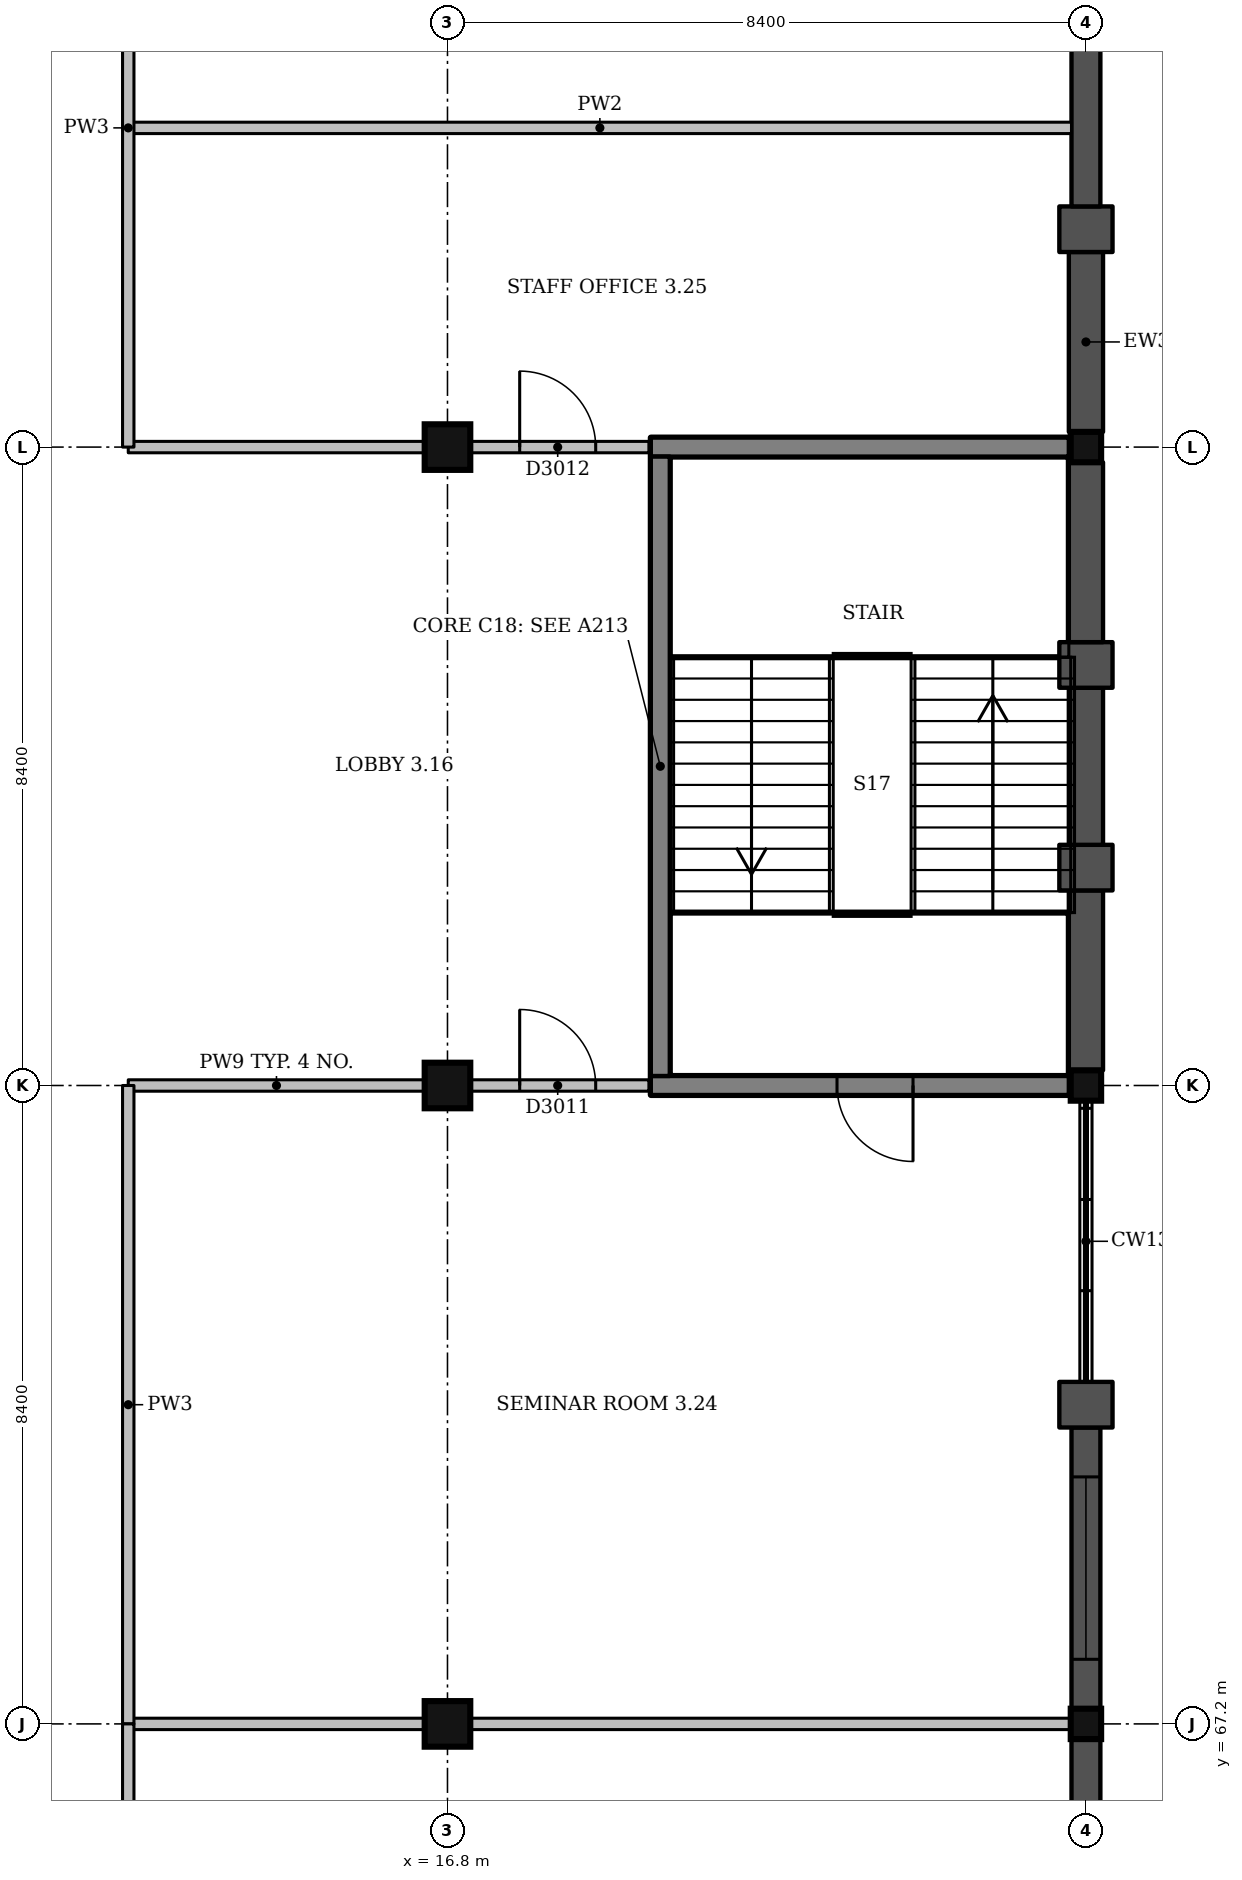
"""IFC4 building model, lengths in metres.
Left out: names, types, materials, properties, quantities, classifications, styles, units other than length and angle.
Written with IfcOpenShell. Run it as: python <this file> out.ifc"""

import sys

from ifc_helpers import new_model, si_unit, direction, frame, frame_2d, origin, origin_2d, place, context, subcontext, project, spatial, rectangle, extrude, element, fill, save


model = new_model("IFC4")
c1 = context("Model", 3, precision=1e-05, world=origin(), true_north=direction((0.0, 1.0)))
c2 = subcontext(c1, "Body", "Model", "MODEL_VIEW")
j1 = project(units=[si_unit("LENGTHUNIT", "METRE"), si_unit("PLANEANGLEUNIT", "RADIAN")], contexts=[c1])
p1 = place(None, origin())
s1 = spatial("IfcSite", under=j1, at=p1, CompositionType="ELEMENT")
p2 = place(p1, origin())
s2 = spatial("IfcBuilding", under=s1, at=p2, CompositionType="ELEMENT")
p3 = place(p2, frame((0.0, 0.0, 13.5)))
s3 = spatial("IfcBuildingStorey", under=s2, at=p3, CompositionType="ELEMENT", Elevation=13.5)
for number, where, z_axis, x_axis in (
    (1, (16.8, 67.2, 0.0), (0.0, 0.0, 1.0), (1.0, 0.0, 0.0)),
    (2, (16.8, 75.6, 0.0), (0.0, 0.0, 1.0), (1.0, 0.0, 0.0)),
    (3, (16.8, 84.0, 0.0), (0.0, 0.0, 1.0), (1.0, 0.0, 0.0)),
):
    element("IfcColumn", number, at=place(p3, frame(where, z_axis=z_axis, x_axis=x_axis)), inside=s3, PredefinedType="COLUMN", context=c2, shape_type="SweptSolid", body=[
        extrude(rectangle(XDim=0.6, YDim=0.6, at=origin_2d()), origin(), (0.0, 0.0, 1.0), 4.5),
    ])
for number, where, z_axis, x_axis in (
    (4, (25.2, 67.2, 0.0), (0.0, 0.0, 1.0), (1.0, 0.0, 0.0)),
    (5, (25.2, 75.6, 0.0), (0.0, 0.0, 1.0), (1.0, 0.0, 0.0)),
    (6, (25.2, 84.0, 0.0), (0.0, 0.0, 1.0), (1.0, 0.0, 0.0)),
):
    element("IfcColumn", number, at=place(p3, frame(where, z_axis=z_axis, x_axis=x_axis)), inside=s3, PredefinedType="COLUMN", context=c2, shape_type="SweptSolid", body=[
        extrude(rectangle(XDim=0.4, YDim=0.4, at=origin_2d()), origin(), (0.0, 0.0, 1.0), 4.5),
    ])
p4 = place(p3, frame((19.475, 75.6, 0.0), z_axis=(0.0, 0.0, 1.0), x_axis=(1.0, 0.0, 0.0)))
e7 = element("IfcWall", 7, at=p4, inside=s3, PredefinedType="SHEAR", context=c2, shape_type="SweptSolid", body=[
    extrude(rectangle(XDim=5.5, YDim=0.25, at=frame_2d((2.75, 0.0))), origin(), (0.0, 0.0, 1.0), 4.5),
])
p5 = place(p4, frame((2.45, 0.0, 0.0)))
e8 = element("IfcOpeningElement", 8, at=p5, cuts=e7, PredefinedType="OPENING", context=c2, shape_type="SweptSolid", body=[
    extrude(rectangle(XDim=1.0, YDim=2.1, at=frame_2d((0.5, 1.05))), frame((0.0, 0.135, 0.0), z_axis=(0.0, -1.0, 0.0), x_axis=(1.0, 0.0, 0.0)), (0.0, 0.0, 1.0), 0.27),
])
p6 = place(p3, frame((19.475, 84.0, 0.0), z_axis=(0.0, 0.0, 1.0), x_axis=(1.0, 0.0, 0.0)))
e9 = element("IfcWall", 9, at=p6, inside=s3, PredefinedType="SHEAR", context=c2, shape_type="SweptSolid", body=[
    extrude(rectangle(XDim=5.5, YDim=0.25, at=frame_2d((2.75, 0.0))), origin(), (0.0, 0.0, 1.0), 4.5),
])
p7 = place(p3, frame((19.6, 75.725, 0.0), z_axis=(0.0, 0.0, 1.0), x_axis=(0.0, 1.0, 0.0)))
e10 = element("IfcWall", 10, at=p7, inside=s3, PredefinedType="SHEAR", context=c2, shape_type="SweptSolid", body=[
    extrude(rectangle(XDim=8.15, YDim=0.25, at=frame_2d((4.075, 0.0))), origin(), (0.0, 0.0, 1.0), 4.5),
])
p8 = place(p3, frame((25.2, 64.633, 0.0), z_axis=(0.0, 0.0, 1.0), x_axis=(0.0, 1.0, 0.0)))
e11 = element("IfcWall", 11, at=p8, inside=s3, PredefinedType="SOLIDWALL", context=c2, shape_type="SweptSolid", body=[
    extrude(rectangle(XDim=2.367, YDim=0.38, at=frame_2d((1.183, 0.0))), origin(), (0.0, 0.0, 1.0), 3.35),
])
p9 = place(p3, frame((25.2, 67.4, 0.0), z_axis=(0.0, 0.0, 1.0), x_axis=(0.0, 1.0, 0.0)))
e12 = element("IfcWall", 12, at=p9, inside=s3, PredefinedType="SOLIDWALL", context=c2, shape_type="SweptSolid", body=[
    extrude(rectangle(XDim=3.7, YDim=0.38, at=frame_2d((1.85, 0.0))), origin(), (0.0, 0.0, 1.0), 3.35),
])
p10 = place(p9, frame((0.65, 0.0, 1.2)))
e13 = element("IfcOpeningElement", 13, at=p10, cuts=e12, PredefinedType="OPENING", context=c2, shape_type="SweptSolid", body=[
    extrude(rectangle(XDim=2.4, YDim=1.5, at=frame_2d((1.2, 0.75))), frame((0.0, 0.2, 0.0), z_axis=(0.0, -1.0, 0.0), x_axis=(1.0, 0.0, 0.0)), (0.0, 0.0, 1.0), 0.4),
])
p11 = place(p3, frame((25.2, 71.1, 0.0), z_axis=(0.0, 0.0, 1.0), x_axis=(0.0, 1.0, 0.0)))
e14 = element("IfcWall", 14, at=p11, inside=s3, PredefinedType="SOLIDWALL", context=c2, shape_type="SweptSolid", body=[
    extrude(rectangle(XDim=0.6, YDim=0.7, at=frame_2d((0.3, 0.0))), origin(), (0.0, 0.0, 1.0), 3.35),
])
p12 = place(p3, frame((25.2, 75.8, 0.0), z_axis=(0.0, 0.0, 1.0), x_axis=(0.0, 1.0, 0.0)))
e15 = element("IfcWall", 15, at=p12, inside=s3, PredefinedType="SOLIDWALL", context=c2, shape_type="SweptSolid", body=[
    extrude(rectangle(XDim=2.367, YDim=0.45, at=frame_2d((1.183, 0.0))), origin(), (0.0, 0.0, 1.0), 3.65),
])
p13 = place(p3, frame((25.2, 78.167, 0.0), z_axis=(0.0, 0.0, 1.0), x_axis=(0.0, 1.0, 0.0)))
e16 = element("IfcWall", 16, at=p13, inside=s3, PredefinedType="SOLIDWALL", context=c2, shape_type="SweptSolid", body=[
    extrude(rectangle(XDim=0.6, YDim=0.7, at=frame_2d((0.3, 0.0))), origin(), (0.0, 0.0, 1.0), 3.65),
])
p14 = place(p3, frame((25.2, 78.767, 0.0), z_axis=(0.0, 0.0, 1.0), x_axis=(0.0, 1.0, 0.0)))
e17 = element("IfcWall", 17, at=p14, inside=s3, PredefinedType="SOLIDWALL", context=c2, shape_type="SweptSolid", body=[
    extrude(rectangle(XDim=2.067, YDim=0.45, at=frame_2d((1.033, 0.0))), origin(), (0.0, 0.0, 1.0), 3.65),
])
p15 = place(p3, frame((25.2, 80.833, 0.0), z_axis=(0.0, 0.0, 1.0), x_axis=(0.0, 1.0, 0.0)))
e18 = element("IfcWall", 18, at=p15, inside=s3, PredefinedType="SOLIDWALL", context=c2, shape_type="SweptSolid", body=[
    extrude(rectangle(XDim=0.6, YDim=0.7, at=frame_2d((0.3, 0.0))), origin(), (0.0, 0.0, 1.0), 3.65),
])
p16 = place(p3, frame((25.2, 81.433, 0.0), z_axis=(0.0, 0.0, 1.0), x_axis=(0.0, 1.0, 0.0)))
e19 = element("IfcWall", 19, at=p16, inside=s3, PredefinedType="SOLIDWALL", context=c2, shape_type="SweptSolid", body=[
    extrude(rectangle(XDim=2.367, YDim=0.45, at=frame_2d((1.183, 0.0))), origin(), (0.0, 0.0, 1.0), 3.65),
])
p17 = place(p3, frame((25.2, 84.2, 0.0), z_axis=(0.0, 0.0, 1.0), x_axis=(0.0, 1.0, 0.0)))
e20 = element("IfcWall", 20, at=p17, inside=s3, PredefinedType="SOLIDWALL", context=c2, shape_type="SweptSolid", body=[
    extrude(rectangle(XDim=2.367, YDim=0.45, at=frame_2d((1.183, 0.0))), origin(), (0.0, 0.0, 1.0), 3.35),
])
p18 = place(p3, frame((25.2, 86.567, 0.0), z_axis=(0.0, 0.0, 1.0), x_axis=(0.0, 1.0, 0.0)))
e21 = element("IfcWall", 21, at=p18, inside=s3, PredefinedType="SOLIDWALL", context=c2, shape_type="SweptSolid", body=[
    extrude(rectangle(XDim=0.6, YDim=0.7, at=frame_2d((0.3, 0.0))), origin(), (0.0, 0.0, 1.0), 3.35),
])
p19 = place(p3, frame((25.2, 87.167, 0.0), z_axis=(0.0, 0.0, 1.0), x_axis=(0.0, 1.0, 0.0)))
e22 = element("IfcWall", 22, at=p19, inside=s3, PredefinedType="SOLIDWALL", context=c2, shape_type="SweptSolid", body=[
    extrude(rectangle(XDim=2.067, YDim=0.38, at=frame_2d((1.033, 0.0))), origin(), (0.0, 0.0, 1.0), 3.35),
])
p20 = place(p3, frame((12.6, 67.2, 0.0), z_axis=(0.0, 0.0, 1.0), x_axis=(1.0, 0.0, 0.0)))
e23 = element("IfcWall", 23, at=p20, inside=s3, PredefinedType="PARTITIONING", context=c2, shape_type="SweptSolid", body=[
    extrude(rectangle(XDim=3.9, YDim=0.15, at=frame_2d((1.95, 0.0))), origin(), (0.0, 0.0, 1.0), 3.4),
])
p21 = place(p3, frame((17.1, 67.2, 0.0), z_axis=(0.0, 0.0, 1.0), x_axis=(1.0, 0.0, 0.0)))
e24 = element("IfcWall", 24, at=p21, inside=s3, PredefinedType="PARTITIONING", context=c2, shape_type="SweptSolid", body=[
    extrude(rectangle(XDim=7.9, YDim=0.15, at=frame_2d((3.95, 0.0))), origin(), (0.0, 0.0, 1.0), 3.35),
])
p22 = place(p3, frame((12.6, 75.6, 0.0), z_axis=(0.0, 0.0, 1.0), x_axis=(1.0, 0.0, 0.0)))
e25 = element("IfcWall", 25, at=p22, inside=s3, PredefinedType="PARTITIONING", context=c2, shape_type="SweptSolid", body=[
    extrude(rectangle(XDim=3.9, YDim=0.15, at=frame_2d((1.95, 0.0))), origin(), (0.0, 0.0, 1.0), 3.4),
])
p23 = place(p3, frame((17.1, 75.6, 0.0), z_axis=(0.0, 0.0, 1.0), x_axis=(1.0, 0.0, 0.0)))
e26 = element("IfcWall", 26, at=p23, inside=s3, PredefinedType="PARTITIONING", context=c2, shape_type="SweptSolid", body=[
    extrude(rectangle(XDim=2.35, YDim=0.15, at=frame_2d((1.175, 0.0))), origin(), (0.0, 0.0, 1.0), 3.5),
])
p24 = place(p23, frame((0.65, 0.0, 0.0)))
e27 = element("IfcOpeningElement", 27, at=p24, cuts=e26, PredefinedType="OPENING", context=c2, shape_type="SweptSolid", body=[
    extrude(rectangle(XDim=1.0, YDim=2.1, at=frame_2d((0.5, 1.05))), frame((0.0, 0.085, 0.0), z_axis=(0.0, -1.0, 0.0), x_axis=(1.0, 0.0, 0.0)), (0.0, 0.0, 1.0), 0.17),
])
p25 = place(p3, frame((12.6, 84.0, 0.0), z_axis=(0.0, 0.0, 1.0), x_axis=(1.0, 0.0, 0.0)))
e28 = element("IfcWall", 28, at=p25, inside=s3, PredefinedType="PARTITIONING", context=c2, shape_type="SweptSolid", body=[
    extrude(rectangle(XDim=3.9, YDim=0.15, at=frame_2d((1.95, 0.0))), origin(), (0.0, 0.0, 1.0), 3.4),
])
p26 = place(p3, frame((17.1, 84.0, 0.0), z_axis=(0.0, 0.0, 1.0), x_axis=(1.0, 0.0, 0.0)))
e29 = element("IfcWall", 29, at=p26, inside=s3, PredefinedType="PARTITIONING", context=c2, shape_type="SweptSolid", body=[
    extrude(rectangle(XDim=2.35, YDim=0.15, at=frame_2d((1.175, 0.0))), origin(), (0.0, 0.0, 1.0), 3.5),
])
p27 = place(p26, frame((0.65, 0.0, 0.0)))
e30 = element("IfcOpeningElement", 30, at=p27, cuts=e29, PredefinedType="OPENING", context=c2, shape_type="SweptSolid", body=[
    extrude(rectangle(XDim=1.0, YDim=2.1, at=frame_2d((0.5, 1.05))), frame((0.0, 0.085, 0.0), z_axis=(0.0, -1.0, 0.0), x_axis=(1.0, 0.0, 0.0)), (0.0, 0.0, 1.0), 0.17),
])
p28 = place(p3, frame((12.6, 88.2, 0.0), z_axis=(0.0, 0.0, 1.0), x_axis=(1.0, 0.0, 0.0)))
e31 = element("IfcWall", 31, at=p28, inside=s3, PredefinedType="PARTITIONING", context=c2, shape_type="SweptSolid", body=[
    extrude(rectangle(XDim=12.41, YDim=0.15, at=frame_2d((6.205, 0.0))), origin(), (0.0, 0.0, 1.0), 3.35),
])
p29 = place(p3, frame((12.6, 67.2, 0.0), z_axis=(0.0, 0.0, 1.0), x_axis=(0.0, 1.0, 0.0)))
e32 = element("IfcWall", 32, at=p29, inside=s3, PredefinedType="PARTITIONING", context=c2, shape_type="SweptSolid", body=[
    extrude(rectangle(XDim=8.4, YDim=0.15, at=frame_2d((4.2, 0.0))), origin(), (0.0, 0.0, 1.0), 3.4),
])
p30 = place(p3, frame((12.6, 84.0, 0.0), z_axis=(0.0, 0.0, 1.0), x_axis=(0.0, 1.0, 0.0)))
e33 = element("IfcWall", 33, at=p30, inside=s3, PredefinedType="PARTITIONING", context=c2, shape_type="SweptSolid", body=[
    extrude(rectangle(XDim=8.4, YDim=0.15, at=frame_2d((4.2, 0.0))), origin(), (0.0, 0.0, 1.0), 3.4),
])
p31 = place(p30, frame((5.9, 0.0, 0.0)))
e34 = element("IfcOpeningElement", 34, at=p31, cuts=e33, PredefinedType="OPENING", context=c2, shape_type="SweptSolid", body=[
    extrude(rectangle(XDim=0.9, YDim=2.1, at=frame_2d((0.45, 1.05))), frame((0.0, 0.085, 0.0), z_axis=(0.0, -1.0, 0.0), x_axis=(1.0, 0.0, 0.0)), (0.0, 0.0, 1.0), 0.17),
])
p32 = place(p3, frame((12.6, 50.675, 0.0), z_axis=(0.0, 0.0, 1.0), x_axis=(0.0, 1.0, 0.0)))
e35 = element("IfcWall", 35, at=p32, inside=s3, PredefinedType="PARTITIONING", context=c2, shape_type="SweptSolid", body=[
    extrude(rectangle(XDim=16.525, YDim=0.15, at=frame_2d((8.262, 0.0))), origin(), (0.0, 0.0, 1.0), 3.4),
])
p33 = place(p32, frame((3.45, 0.0, 0.0)))
e36 = element("IfcOpeningElement", 36, at=p33, cuts=e35, PredefinedType="OPENING", context=c2, shape_type="SweptSolid", body=[
    extrude(rectangle(XDim=1.0, YDim=2.1, at=frame_2d((0.5, 1.05))), frame((0.0, 0.085, 0.0), z_axis=(0.0, -1.0, 0.0), x_axis=(1.0, 0.0, 0.0)), (0.0, 0.0, 1.0), 0.17),
])
p34 = place(p32, frame((11.925, 0.0, 0.0)))
e37 = element("IfcOpeningElement", 37, at=p34, cuts=e35, PredefinedType="OPENING", context=c2, shape_type="SweptSolid", body=[
    extrude(rectangle(XDim=1.0, YDim=2.1, at=frame_2d((0.5, 1.05))), frame((0.0, 0.085, 0.0), z_axis=(0.0, -1.0, 0.0), x_axis=(1.0, 0.0, 0.0)), (0.0, 0.0, 1.0), 0.17),
])
p35 = place(p10, origin())
e38 = element("IfcWindow", 38, at=p35, inside=s3, PartitioningType="SINGLE_PANEL", PredefinedType="WINDOW", context=c2, shape_type="SweptSolid", body=[
    extrude(rectangle(XDim=2.4, YDim=1.5, at=frame_2d((1.2, 0.75))), frame((0.0, 0.15, 0.0), z_axis=(0.0, -1.0, 0.0), x_axis=(1.0, 0.0, 0.0)), (0.0, 0.0, 1.0), 0.06),
])
fill(e13, e38)
p36 = place(p24, origin())
e39 = element("IfcDoor", 39, at=p36, inside=s3, OperationType="SINGLE_SWING_LEFT", PredefinedType="DOOR", context=c2, shape_type="SweptSolid", body=[
    extrude(rectangle(XDim=1.0, YDim=2.1, at=frame_2d((0.5, 1.05))), frame((0.0, 0.025, 0.0), z_axis=(0.0, -1.0, 0.0), x_axis=(1.0, 0.0, 0.0)), (0.0, 0.0, 1.0), 0.05),
])
fill(e27, e39)
p37 = place(p27, origin())
e40 = element("IfcDoor", 40, at=p37, inside=s3, OperationType="SINGLE_SWING_LEFT", PredefinedType="DOOR", context=c2, shape_type="SweptSolid", body=[
    extrude(rectangle(XDim=1.0, YDim=2.1, at=frame_2d((0.5, 1.05))), frame((0.0, 0.025, 0.0), z_axis=(0.0, -1.0, 0.0), x_axis=(1.0, 0.0, 0.0)), (0.0, 0.0, 1.0), 0.05),
])
fill(e30, e40)
p38 = place(p5, origin())
e41 = element("IfcDoor", 41, at=p38, inside=s3, OperationType="SINGLE_SWING_RIGHT", PredefinedType="DOOR", context=c2, shape_type="SweptSolid", body=[
    extrude(rectangle(XDim=1.0, YDim=2.1, at=frame_2d((0.5, 1.05))), frame((0.0, 0.025, 0.0), z_axis=(0.0, -1.0, 0.0), x_axis=(1.0, 0.0, 0.0)), (0.0, 0.0, 1.0), 0.05),
])
fill(e8, e41)
save(model, sys.argv[1])
